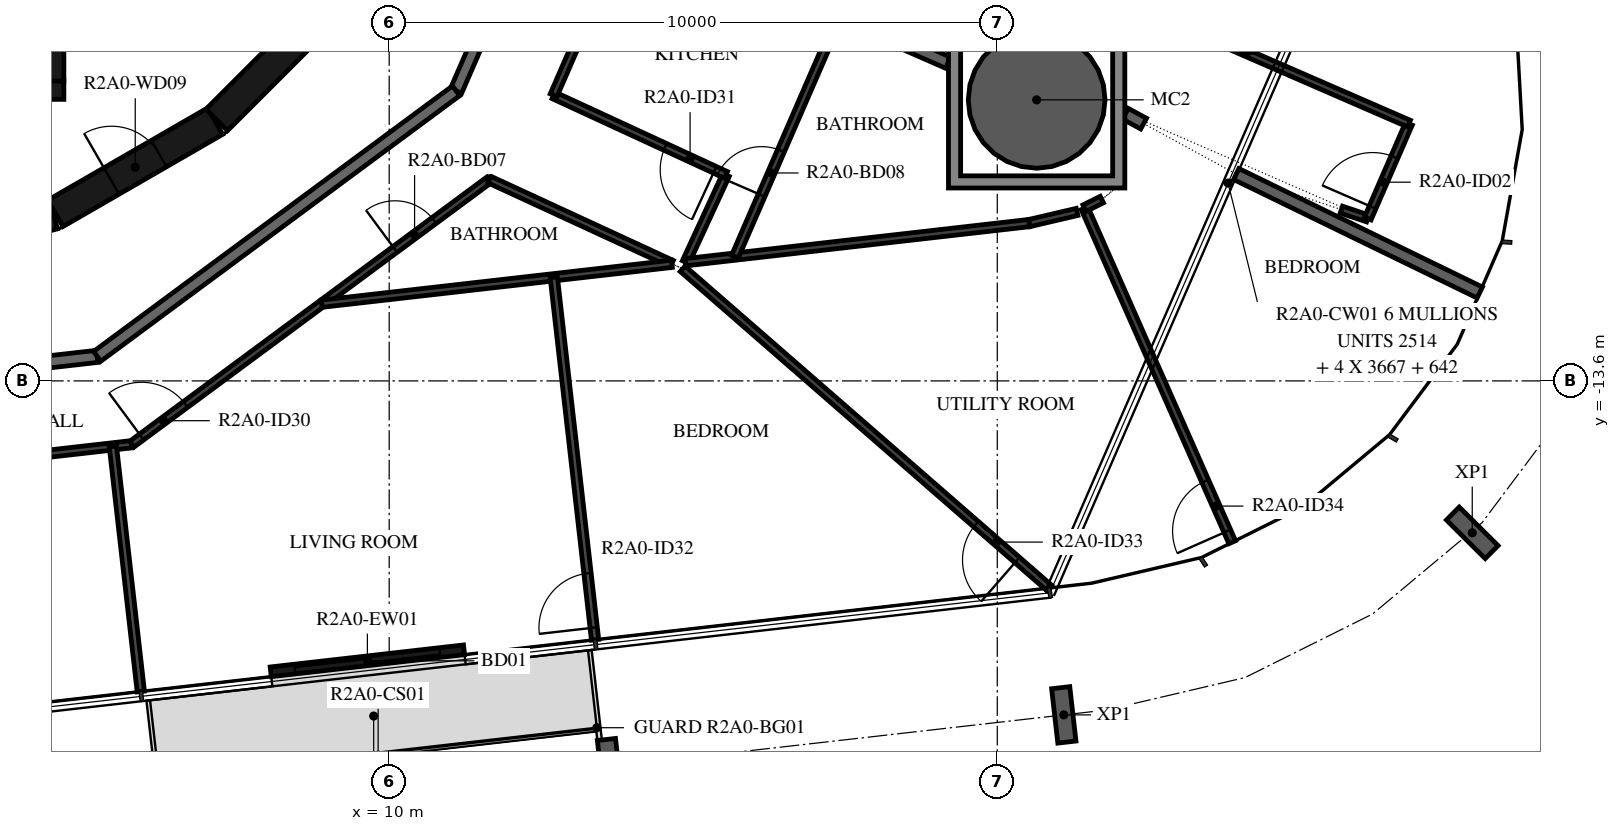
"""IFC4 building model, lengths in metres.
Left out: names, types, materials, properties, quantities, classifications, styles, units other than length and angle.
Written with IfcOpenShell. Run it as: python <this file> out.ifc"""

import sys

from ifc_helpers import new_model, si_unit, direction, frame, frame_2d, origin, origin_2d, place, context, subcontext, project, spatial, polyline, rectangle, hollow_circle, i_section, outline, extrude, element, fill, save


model = new_model("IFC4")
c1 = context("Model", 3, precision=1e-05, world=origin(), true_north=direction((0.0, 1.0)))
c2 = subcontext(c1, "Body", "Model", "MODEL_VIEW")
j1 = project(units=[si_unit("LENGTHUNIT", "METRE"), si_unit("PLANEANGLEUNIT", "RADIAN")], contexts=[c1])
p1 = place(None, origin())
s1 = spatial("IfcSite", under=j1, at=p1, CompositionType="ELEMENT")
p2 = place(p1, origin())
s2 = spatial("IfcBuilding", under=s1, at=p2, CompositionType="ELEMENT")
p3 = place(p2, frame((0.0, 0.0, 83.7)))
s3 = spatial("IfcBuildingStorey", under=s2, at=p3, CompositionType="ELEMENT", Elevation=83.7)
p4 = place(p3, frame((20.648, -8.978, -0.38), z_axis=(0.0, 0.0, 1.0), x_axis=(1.0, 0.0, 0.0)))
e1 = element("IfcColumn", 1, at=p4, inside=s3, PredefinedType="COLUMN", context=c2, shape_type="SweptSolid", body=[
    extrude(hollow_circle(Radius=1.125, WallThickness=0.055, at=origin_2d()), origin(), (0.0, 0.0, 1.0), 3.5),
])
for number, where, z_axis, x_axis in (
    (2, (13.624, -19.944, -0.38), (0.0, 0.0, 1.0), (-0.994, -0.113, 0.0)),
    (3, (21.094, -19.092, -0.38), (0.0, 0.0, 1.0), (-0.994, -0.113, 0.0)),
    (4, (27.811, -16.098, -0.38), (0.0, 0.0, 1.0), (-0.705, -0.709, 0.0)),
):
    element("IfcColumn", number, at=place(p3, frame(where, z_axis=z_axis, x_axis=x_axis)), inside=s3, PredefinedType="COLUMN", context=c2, shape_type="SweptSolid", body=[
        extrude(i_section(OverallWidth=0.3, OverallDepth=0.9, WebThickness=0.019, FlangeThickness=0.035, FilletRadius=0.03, at=origin_2d()), origin(), (0.0, 0.0, 1.0), 3.5),
    ])
p5 = place(p3, frame((8.052, -18.384, 0.0), z_axis=(0.0, 0.0, 1.0), x_axis=(0.993569997097, 0.113219525124, 0.0)))
e5 = element("IfcWall", 5, at=p5, inside=s3, PredefinedType="STANDARD", context=c2, shape_type="SweptSolid", body=[
    extrude(rectangle(XDim=3.2, YDim=0.16, at=frame_2d((1.6, 0.0))), origin(), (0.0, 0.0, 1.0), 3.12),
])
p6 = place(p5, frame((0.4, 0.0, 0.0)))
e6 = element("IfcOpeningElement", 6, at=p6, cuts=e5, PredefinedType="OPENING", context=c2, shape_type="SweptSolid", body=[
    extrude(rectangle(XDim=2.4, YDim=2.4, at=frame_2d((1.2, 1.2))), frame((0.0, 0.09, 0.0), z_axis=(0.0, -1.0, 0.0), x_axis=(1.0, 0.0, 0.0)), (0.0, 0.0, 1.0), 0.18),
])
p7 = place(p3, frame((1.55, -11.643, 0.0), z_axis=(0.0, 0.0, 1.0), x_axis=(0.965948410781, 0.258734743916, 0.0)))
e7 = element("IfcWall", 7, at=p7, inside=s3, PredefinedType="SHEAR", context=c2, shape_type="SweptSolid", body=[
    extrude(rectangle(XDim=3.033, YDim=0.5, at=frame_2d((1.516, 0.0))), origin(), (0.0, 0.0, 1.0), 3.12),
])
p8 = place(p3, frame((4.51, -10.845, 0.0), z_axis=(0.0, 0.0, 1.0), x_axis=(0.865975092491, 0.500087131594, 0.0)))
e8 = element("IfcWall", 8, at=p8, inside=s3, PredefinedType="SHEAR", context=c2, shape_type="SweptSolid", body=[
    extrude(rectangle(XDim=3.033, YDim=0.5, at=frame_2d((1.516, 0.0))), origin(), (0.0, 0.0, 1.0), 3.12),
])
p9 = place(p8, frame((1.066, 0.0, 0.0)))
e9 = element("IfcOpeningElement", 9, at=p9, cuts=e8, PredefinedType="OPENING", context=c2, shape_type="SweptSolid", body=[
    extrude(rectangle(XDim=0.9, YDim=2.1, at=frame_2d((0.45, 1.05))), frame((0.0, 0.26, 0.0), z_axis=(0.0, -1.0, 0.0), x_axis=(1.0, 0.0, 0.0)), (0.0, 0.0, 1.0), 0.52),
])
p10 = place(p3, frame((7.164, -9.308, 0.0), z_axis=(0.0, 0.0, 1.0), x_axis=(0.707106781187, 0.707106781187, 0.0)))
e10 = element("IfcWall", 10, at=p10, inside=s3, PredefinedType="SHEAR", context=c2, shape_type="SweptSolid", body=[
    extrude(rectangle(XDim=3.032, YDim=0.5, at=frame_2d((1.516, 0.0))), origin(), (0.0, 0.0, 1.0), 3.12),
])
p11 = place(p3, frame((4.5, -8.67, 0.0), z_axis=(0.0, 0.0, 1.0), x_axis=(0.0, 1.0, 0.0)))
e11 = element("IfcWall", 11, at=p11, inside=s3, PredefinedType="SHEAR", context=c2, shape_type="SweptSolid", body=[
    extrude(rectangle(XDim=3.32, YDim=0.3, at=frame_2d((1.66, 0.0))), origin(), (0.0, 0.0, 1.0), 3.12),
])
p12 = place(p3, frame((0.1, -8.82, 0.0), z_axis=(0.0, 0.0, 1.0), x_axis=(1.0, 0.0, 0.0)))
e12 = element("IfcWall", 12, at=p12, inside=s3, PredefinedType="SHEAR", context=c2, shape_type="SweptSolid", body=[
    extrude(rectangle(XDim=4.55, YDim=0.3, at=frame_2d((2.275, 0.0))), origin(), (0.0, 0.0, 1.0), 3.12),
])
p13 = place(p3, frame((11.1, -8.829, 0.0), z_axis=(0.0, 0.0, 1.0), x_axis=(0.398741918631, 0.917063183388, 0.0)))
e13 = element("IfcWall", 13, at=p13, inside=s3, PredefinedType="STANDARD", context=c2, shape_type="SweptSolid", body=[
    extrude(rectangle(XDim=7.342, YDim=0.2, at=frame_2d((3.671, 0.0))), origin(), (0.0, 0.0, 1.0), 3.12),
])
p14 = place(p3, frame((-2.096, -14.028, 0.0), z_axis=(0.0, 0.0, 1.0), x_axis=(0.993569170114, 0.113226782163, 0.0)))
e14 = element("IfcWall", 14, at=p14, inside=s3, PredefinedType="STANDARD", context=c2, shape_type="SweptSolid", body=[
    extrude(rectangle(XDim=7.342, YDim=0.2, at=frame_2d((3.671, 0.0))), origin(), (0.0, 0.0, 1.0), 3.12),
])
p15 = place(p14, frame((0.5, 0.0, 0.0)))
e15 = element("IfcOpeningElement", 15, at=p15, cuts=e14, PredefinedType="OPENING", context=c2, shape_type="SweptSolid", body=[
    extrude(rectangle(XDim=1.0, YDim=2.1, at=frame_2d((0.5, 1.05))), frame((0.0, 0.11, 0.0), z_axis=(0.0, -1.0, 0.0), x_axis=(1.0, 0.0, 0.0)), (0.0, 0.0, 1.0), 0.22),
])
p16 = place(p3, frame((5.198, -13.196, 0.0), z_axis=(0.0, 0.0, 1.0), x_axis=(0.803869883159, 0.594805187394, 0.0)))
e16 = element("IfcWall", 16, at=p16, inside=s3, PredefinedType="STANDARD", context=c2, shape_type="SweptSolid", body=[
    extrude(rectangle(XDim=7.342, YDim=0.2, at=frame_2d((3.671, 0.0))), origin(), (0.0, 0.0, 1.0), 3.12),
])
p17 = place(p3, frame((12.564, -5.463, 0.0), z_axis=(0.0, 0.0, 1.0), x_axis=(0.915914014963, -0.401374534812, 0.0)))
e17 = element("IfcWall", 17, at=p17, inside=s3, PredefinedType="STANDARD", context=c2, shape_type="SweptSolid", body=[
    extrude(rectangle(XDim=7.236, YDim=0.2, at=frame_2d((3.618, 0.0))), origin(), (0.0, 0.0, 1.0), 3.12),
])
p18 = place(p3, frame((22.108, -9.207, 0.0), z_axis=(0.0, 0.0, 1.0), x_axis=(0.878251516807, -0.478198989151, 0.0)))
e18 = element("IfcWall", 18, at=p18, inside=s3, PredefinedType="STANDARD", context=c2, shape_type="SweptSolid", body=[
    extrude(rectangle(XDim=0.341, YDim=0.2, at=frame_2d((0.17, 0.0))), origin(), (0.0, 0.0, 1.0), 3.12),
])
p19 = place(p3, frame((23.929, -10.198, 0.0), z_axis=(0.0, 0.0, 1.0), x_axis=(0.899252572086, -0.437429779046, 0.0)))
e19 = element("IfcWall", 19, at=p19, inside=s3, PredefinedType="STANDARD", context=c2, shape_type="SweptSolid", body=[
    extrude(rectangle(XDim=4.454, YDim=0.2, at=frame_2d((2.227, 0.0))), origin(), (0.0, 0.0, 1.0), 3.12),
])
p20 = place(p3, frame((25.659, -10.783, 0.0), z_axis=(0.0, 0.0, 1.0), x_axis=(0.948362418423, -0.317188781837, 0.0)))
e20 = element("IfcWall", 20, at=p20, inside=s3, PredefinedType="PARTITIONING", context=c2, shape_type="SweptSolid", body=[
    extrude(rectangle(XDim=0.457, YDim=0.12, at=frame_2d((0.229, 0.0))), origin(), (0.0, 0.0, 1.0), 3.12),
])
p21 = place(p3, frame((26.092, -10.928, 0.0), z_axis=(0.0, 0.0, 1.0), x_axis=(0.398783871208, 0.917044941137, 0.0)))
e21 = element("IfcWall", 21, at=p21, inside=s3, PredefinedType="PARTITIONING", context=c2, shape_type="SweptSolid", body=[
    extrude(rectangle(XDim=1.7, YDim=0.12, at=frame_2d((0.85, 0.0))), origin(), (0.0, 0.0, 1.0), 3.12),
])
p22 = place(p21, frame((0.2, 0.0, 0.0)))
e22 = element("IfcOpeningElement", 22, at=p22, cuts=e21, PredefinedType="OPENING", context=c2, shape_type="SweptSolid", body=[
    extrude(rectangle(XDim=0.9, YDim=2.1, at=frame_2d((0.45, 1.05))), frame((0.0, 0.07, 0.0), z_axis=(0.0, -1.0, 0.0), x_axis=(1.0, 0.0, 0.0)), (0.0, 0.0, 1.0), 0.14),
])
p23 = place(p3, frame((26.77, -9.369, 0.0), z_axis=(0.0, 0.0, 1.0), x_axis=(-0.917058488031, 0.39875271727, 0.0)))
e23 = element("IfcWall", 23, at=p23, inside=s3, PredefinedType="PARTITIONING", context=c2, shape_type="SweptSolid", body=[
    extrude(rectangle(XDim=13.086, YDim=0.12, at=frame_2d((6.543, 0.0))), origin(), (0.0, 0.0, 1.0), 3.12),
])
p24 = place(p23, frame((6.889, 0.0, 0.0)))
e24 = element("IfcOpeningElement", 24, at=p24, cuts=e23, PredefinedType="OPENING", context=c2, shape_type="SweptSolid", body=[
    extrude(rectangle(XDim=0.8, YDim=2.1, at=frame_2d((0.4, 1.05))), frame((0.0, 0.07, 0.0), z_axis=(0.0, -1.0, 0.0), x_axis=(1.0, 0.0, 0.0)), (0.0, 0.0, 1.0), 0.14),
])
p25 = place(p23, frame((9.358, 0.0, 0.0)))
e25 = element("IfcOpeningElement", 25, at=p25, cuts=e23, PredefinedType="OPENING", context=c2, shape_type="SweptSolid", body=[
    extrude(rectangle(XDim=0.9, YDim=2.1, at=frame_2d((0.45, 1.05))), frame((0.0, 0.07, 0.0), z_axis=(0.0, -1.0, 0.0), x_axis=(1.0, 0.0, 0.0)), (0.0, 0.0, 1.0), 0.14),
])
p26 = place(p3, frame((23.93, -7.573, 0.0), z_axis=(0.0, 0.0, 1.0), x_axis=(0.28441027407, -0.958702662979, 0.0)))
e26 = element("IfcWall", 26, at=p26, inside=s3, PredefinedType="PARTITIONING", context=c2, shape_type="SweptSolid", body=[
    extrude(rectangle(XDim=0.671, YDim=0.12, at=frame_2d((0.336, 0.0))), origin(), (0.0, 0.0, 1.0), 3.12),
])
p27 = place(p3, frame((3.138, -14.941, 0.0), z_axis=(0.0, 0.0, 1.0), x_axis=(0.99356355736, 0.113276023437, 0.0)))
e27 = element("IfcWall", 27, at=p27, inside=s3, PredefinedType="PARTITIONING", context=c2, shape_type="SweptSolid", body=[
    extrude(rectangle(XDim=2.647, YDim=0.12, at=frame_2d((1.323, 0.0))), origin(), (0.0, 0.0, 1.0), 3.12),
])
p28 = place(p3, frame((5.767, -14.641, 0.0), z_axis=(0.0, 0.0, 1.0), x_axis=(0.803867427863, 0.594808505673, 0.0)))
e28 = element("IfcWall", 28, at=p28, inside=s3, PredefinedType="PARTITIONING", context=c2, shape_type="SweptSolid", body=[
    extrude(rectangle(XDim=7.316, YDim=0.12, at=frame_2d((3.658, 0.0))), origin(), (0.0, 0.0, 1.0), 3.12),
])
p29 = place(p28, frame((0.2, 0.0, 0.0)))
e29 = element("IfcOpeningElement", 29, at=p29, cuts=e28, PredefinedType="OPENING", context=c2, shape_type="SweptSolid", body=[
    extrude(rectangle(XDim=0.9, YDim=2.1, at=frame_2d((0.45, 1.05))), frame((0.0, 0.07, 0.0), z_axis=(0.0, -1.0, 0.0), x_axis=(1.0, 0.0, 0.0)), (0.0, 0.0, 1.0), 0.14),
])
p30 = place(p28, frame((5.385, 0.0, 0.0)))
e30 = element("IfcOpeningElement", 30, at=p30, cuts=e28, PredefinedType="OPENING", context=c2, shape_type="SweptSolid", body=[
    extrude(rectangle(XDim=0.8, YDim=2.1, at=frame_2d((0.4, 1.05))), frame((0.0, 0.07, 0.0), z_axis=(0.0, -1.0, 0.0), x_axis=(1.0, 0.0, 0.0)), (0.0, 0.0, 1.0), 0.14),
])
p31 = place(p3, frame((11.649, -10.289, 0.0), z_axis=(0.0, 0.0, 1.0), x_axis=(0.9079269461, -0.419128453514, 0.0)))
e31 = element("IfcWall", 31, at=p31, inside=s3, PredefinedType="PARTITIONING", context=c2, shape_type="SweptSolid", body=[
    extrude(rectangle(XDim=3.304, YDim=0.12, at=frame_2d((1.652, 0.0))), origin(), (0.0, 0.0, 1.0), 3.12),
])
p32 = place(p3, frame((14.875, -11.648, 0.0), z_axis=(0.0, 0.0, 1.0), x_axis=(0.419087543301, 0.90794583046, 0.0)))
e32 = element("IfcWall", 32, at=p32, inside=s3, PredefinedType="PARTITIONING", context=c2, shape_type="SweptSolid", body=[
    extrude(rectangle(XDim=1.582, YDim=0.12, at=frame_2d((0.791, 0.0))), origin(), (0.0, 0.0, 1.0), 3.12),
])
p33 = place(p3, frame((15.538, -10.212, 0.0), z_axis=(0.0, 0.0, 1.0), x_axis=(-0.907941075756, 0.419097844131, 0.0)))
e33 = element("IfcWall", 33, at=p33, inside=s3, PredefinedType="PARTITIONING", context=c2, shape_type="SweptSolid", body=[
    extrude(rectangle(XDim=3.122, YDim=0.12, at=frame_2d((1.561, 0.0))), origin(), (0.0, 0.0, 1.0), 3.12),
])
p34 = place(p33, frame((0.2, 0.0, 0.0)))
e34 = element("IfcOpeningElement", 34, at=p34, cuts=e33, PredefinedType="OPENING", context=c2, shape_type="SweptSolid", body=[
    extrude(rectangle(XDim=0.9, YDim=2.1, at=frame_2d((0.45, 1.05))), frame((0.0, 0.07, 0.0), z_axis=(0.0, -1.0, 0.0), x_axis=(1.0, 0.0, 0.0)), (0.0, 0.0, 1.0), 0.14),
])
p35 = place(p3, frame((12.703, -8.904, 0.0), z_axis=(0.0, 0.0, 1.0), x_axis=(0.398679720725, 0.917090224723, 0.0)))
e35 = element("IfcWall", 35, at=p35, inside=s3, PredefinedType="PARTITIONING", context=c2, shape_type="SweptSolid", body=[
    extrude(rectangle(XDim=3.079, YDim=0.12, at=frame_2d((1.54, 0.0))), origin(), (0.0, 0.0, 1.0), 3.12),
])
p36 = place(p3, frame((5.915, -18.708, 0.0), z_axis=(0.0, 0.0, 1.0), x_axis=(-0.113244511591, 0.993567149515, 0.0)))
e36 = element("IfcWall", 36, at=p36, inside=s3, PredefinedType="PARTITIONING", context=c2, shape_type="SweptSolid", body=[
    extrude(rectangle(XDim=4.057, YDim=0.12, at=frame_2d((2.029, 0.0))), origin(), (0.0, 0.0, 1.0), 2.73),
])
p37 = place(p3, frame((14.649, -11.674, 0.0), z_axis=(0.0, 0.0, 1.0), x_axis=(-0.993573746873, -0.113186613721, 0.0)))
e37 = element("IfcWall", 37, at=p37, inside=s3, PredefinedType="PARTITIONING", context=c2, shape_type="SweptSolid", body=[
    extrude(rectangle(XDim=5.796, YDim=0.12, at=frame_2d((2.898, 0.0))), origin(), (0.0, 0.0, 1.0), 3.12),
])
p38 = place(p3, frame((13.386, -17.857, 0.0), z_axis=(0.0, 0.0, 1.0), x_axis=(-0.113200012983, 0.993572220355, 0.0)))
e38 = element("IfcWall", 38, at=p38, inside=s3, PredefinedType="PARTITIONING", context=c2, shape_type="SweptSolid", body=[
    extrude(rectangle(XDim=6.0, YDim=0.12, at=frame_2d((3.0, 0.0))), origin(), (0.0, 0.0, 1.0), 2.73),
])
p39 = place(p38, frame((0.2, 0.0, 0.0)))
e39 = element("IfcOpeningElement", 39, at=p39, cuts=e38, PredefinedType="OPENING", context=c2, shape_type="SweptSolid", body=[
    extrude(rectangle(XDim=0.9, YDim=2.1, at=frame_2d((0.45, 1.05))), frame((0.0, 0.07, 0.0), z_axis=(0.0, -1.0, 0.0), x_axis=(1.0, 0.0, 0.0)), (0.0, 0.0, 1.0), 0.14),
])
p40 = place(p3, frame((20.856, -17.006, 0.0), z_axis=(0.0, 0.0, 1.0), x_axis=(-0.75423134567, 0.656608770281, 0.0)))
e40 = element("IfcWall", 40, at=p40, inside=s3, PredefinedType="PARTITIONING", context=c2, shape_type="SweptSolid", body=[
    extrude(rectangle(XDim=7.995, YDim=0.12, at=frame_2d((3.998, 0.0))), origin(), (0.0, 0.0, 1.0), 3.12),
])
p41 = place(p40, frame((0.7, 0.0, 0.0)))
e41 = element("IfcOpeningElement", 41, at=p41, cuts=e40, PredefinedType="OPENING", context=c2, shape_type="SweptSolid", body=[
    extrude(rectangle(XDim=0.9, YDim=2.1, at=frame_2d((0.45, 1.05))), frame((0.0, 0.07, 0.0), z_axis=(0.0, -1.0, 0.0), x_axis=(1.0, 0.0, 0.0)), (0.0, 0.0, 1.0), 0.14),
])
p42 = place(p3, frame((20.527, -11.004, 0.0), z_axis=(0.0, 0.0, 1.0), x_axis=(-0.993568869194, -0.113229422712, 0.0)))
e42 = element("IfcWall", 42, at=p42, inside=s3, PredefinedType="PARTITIONING", context=c2, shape_type="SweptSolid", body=[
    extrude(rectangle(XDim=5.688, YDim=0.12, at=frame_2d((2.844, 0.0))), origin(), (0.0, 0.0, 1.0), 3.12),
])
p43 = place(p3, frame((21.312, -10.821, 0.0), z_axis=(0.0, 0.0, 1.0), x_axis=(-0.973765266404, -0.227554841621, 0.0)))
e43 = element("IfcWall", 43, at=p43, inside=s3, PredefinedType="PARTITIONING", context=c2, shape_type="SweptSolid", body=[
    extrude(rectangle(XDim=0.807, YDim=0.12, at=frame_2d((0.403, 0.0))), origin(), (0.0, 0.0, 1.0), 3.12),
])
p44 = place(p3, frame((23.864, -16.253, 0.0), z_axis=(0.0, 0.0, 1.0), x_axis=(-0.404274566917, 0.914637673915, 0.0)))
e44 = element("IfcWall", 44, at=p44, inside=s3, PredefinedType="PARTITIONING", context=c2, shape_type="SweptSolid", body=[
    extrude(rectangle(XDim=6.006, YDim=0.12, at=frame_2d((3.003, 0.0))), origin(), (0.0, 0.0, 1.0), 3.12),
])
p45 = place(p44, frame((0.2, 0.0, 0.0)))
e45 = element("IfcOpeningElement", 45, at=p45, cuts=e44, PredefinedType="OPENING", context=c2, shape_type="SweptSolid", body=[
    extrude(rectangle(XDim=0.9, YDim=2.1, at=frame_2d((0.45, 1.05))), frame((0.0, 0.07, 0.0), z_axis=(0.0, -1.0, 0.0), x_axis=(1.0, 0.0, 0.0)), (0.0, 0.0, 1.0), 0.14),
])
p46 = place(p3, frame((15.686, -11.556, 0.0), z_axis=(0.0, 0.0, 1.0), x_axis=(0.398740569839, 0.917063769846, 0.0)))
e46 = element("IfcWall", 46, at=p46, inside=s3, PredefinedType="PARTITIONING", context=c2, shape_type="SweptSolid", body=[
    extrude(rectangle(XDim=4.322, YDim=0.12, at=frame_2d((2.161, 0.0))), origin(), (0.0, 0.0, 1.0), 3.12),
])
p47 = place(p46, frame((1.1, 0.0, 0.0)))
e47 = element("IfcOpeningElement", 47, at=p47, cuts=e46, PredefinedType="OPENING", context=c2, shape_type="SweptSolid", body=[
    extrude(rectangle(XDim=0.8, YDim=2.1, at=frame_2d((0.4, 1.05))), frame((0.0, 0.07, 0.0), z_axis=(0.0, -1.0, 0.0), x_axis=(1.0, 0.0, 0.0)), (0.0, 0.0, 1.0), 0.14),
])
p48 = place(p3, frame((21.435, -10.76, 0.0), z_axis=(0.0, 0.0, 1.0), x_axis=(0.895041493646, 0.445982874841, 0.0)))
e48 = element("IfcWall", 48, at=p48, inside=s3, PredefinedType="PARTITIONING", context=c2, shape_type="SweptSolid", body=[
    extrude(rectangle(XDim=0.317, YDim=0.12, at=frame_2d((0.159, 0.0))), origin(), (0.0, 0.0, 1.0), 3.12),
])
p49 = place(p3, origin())
e49 = element("IfcWall", 49, at=p49, inside=s3, PredefinedType="STANDARD", context=c2, shape_type="SweptSolid", body=[
    extrude(outline(polyline([(22.098, -7.528), (22.098, -10.428), (19.198, -10.428), (19.198, -7.528), (22.098, -7.528)]), holes=[polyline([(19.398, -10.228), (21.898, -10.228), (21.898, -7.728), (19.398, -7.728), (19.398, -10.228)])]), origin(), (0.0, 0.0, 1.0), 3.12),
])
p50 = place(p6, origin())
e50 = element("IfcDoor", 50, at=p50, inside=s3, OperationType="DOUBLE_DOOR_SLIDING", PredefinedType="DOOR", context=c2, shape_type="SweptSolid", body=[
    extrude(rectangle(XDim=2.4, YDim=2.4, at=frame_2d((1.2, 1.2))), frame((0.0, 0.025, 0.0), z_axis=(0.0, -1.0, 0.0), x_axis=(1.0, 0.0, 0.0)), (0.0, 0.0, 1.0), 0.05),
])
fill(e6, e50)
p51 = place(p9, origin())
e51 = element("IfcDoor", 51, at=p51, inside=s3, OperationType="SINGLE_SWING_RIGHT", PredefinedType="DOOR", context=c2, shape_type="SweptSolid", body=[
    extrude(rectangle(XDim=0.9, YDim=2.1, at=frame_2d((0.45, 1.05))), frame((0.0, 0.025, 0.0), z_axis=(0.0, -1.0, 0.0), x_axis=(1.0, 0.0, 0.0)), (0.0, 0.0, 1.0), 0.05),
])
fill(e9, e51)
p52 = place(p22, origin())
e52 = element("IfcDoor", 52, at=p52, inside=s3, OperationType="SINGLE_SWING_LEFT", PredefinedType="DOOR", context=c2, shape_type="SweptSolid", body=[
    extrude(rectangle(XDim=0.9, YDim=2.1, at=frame_2d((0.45, 1.05))), frame((0.0, 0.025, 0.0), z_axis=(0.0, -1.0, 0.0), x_axis=(1.0, 0.0, 0.0)), (0.0, 0.0, 1.0), 0.05),
])
fill(e22, e52)
p53 = place(p29, origin())
e53 = element("IfcDoor", 53, at=p53, inside=s3, OperationType="SINGLE_SWING_RIGHT", PredefinedType="DOOR", context=c2, shape_type="SweptSolid", body=[
    extrude(rectangle(XDim=0.9, YDim=2.1, at=frame_2d((0.45, 1.05))), frame((0.0, 0.025, 0.0), z_axis=(0.0, -1.0, 0.0), x_axis=(1.0, 0.0, 0.0)), (0.0, 0.0, 1.0), 0.05),
])
fill(e29, e53)
p54 = place(p30, origin())
e54 = element("IfcDoor", 54, at=p54, inside=s3, OperationType="SINGLE_SWING_RIGHT", PredefinedType="DOOR", context=c2, shape_type="SweptSolid", body=[
    extrude(rectangle(XDim=0.8, YDim=2.1, at=frame_2d((0.4, 1.05))), frame((0.0, 0.025, 0.0), z_axis=(0.0, -1.0, 0.0), x_axis=(1.0, 0.0, 0.0)), (0.0, 0.0, 1.0), 0.05),
])
fill(e30, e54)
p55 = place(p34, origin())
e55 = element("IfcDoor", 55, at=p55, inside=s3, OperationType="SINGLE_SWING_LEFT", PredefinedType="DOOR", context=c2, shape_type="SweptSolid", body=[
    extrude(rectangle(XDim=0.9, YDim=2.1, at=frame_2d((0.45, 1.05))), frame((0.0, 0.025, 0.0), z_axis=(0.0, -1.0, 0.0), x_axis=(1.0, 0.0, 0.0)), (0.0, 0.0, 1.0), 0.05),
])
fill(e34, e55)
p56 = place(p39, origin())
e56 = element("IfcDoor", 56, at=p56, inside=s3, OperationType="SINGLE_SWING_RIGHT", PredefinedType="DOOR", context=c2, shape_type="SweptSolid", body=[
    extrude(rectangle(XDim=0.9, YDim=2.1, at=frame_2d((0.45, 1.05))), frame((0.0, 0.025, 0.0), z_axis=(0.0, -1.0, 0.0), x_axis=(1.0, 0.0, 0.0)), (0.0, 0.0, 1.0), 0.05),
])
fill(e39, e56)
p57 = place(p47, origin())
e57 = element("IfcDoor", 57, at=p57, inside=s3, OperationType="SINGLE_SWING_RIGHT", PredefinedType="DOOR", context=c2, shape_type="SweptSolid", body=[
    extrude(rectangle(XDim=0.8, YDim=2.1, at=frame_2d((0.4, 1.05))), frame((0.0, 0.025, 0.0), z_axis=(0.0, -1.0, 0.0), x_axis=(1.0, 0.0, 0.0)), (0.0, 0.0, 1.0), 0.05),
])
fill(e47, e57)
p58 = place(p41, origin())
e58 = element("IfcDoor", 58, at=p58, inside=s3, OperationType="SINGLE_SWING_RIGHT", PredefinedType="DOOR", context=c2, shape_type="SweptSolid", body=[
    extrude(rectangle(XDim=0.9, YDim=2.1, at=frame_2d((0.45, 1.05))), frame((0.0, 0.025, 0.0), z_axis=(0.0, -1.0, 0.0), x_axis=(1.0, 0.0, 0.0)), (0.0, 0.0, 1.0), 0.05),
])
fill(e41, e58)
p59 = place(p45, origin())
e59 = element("IfcDoor", 59, at=p59, inside=s3, OperationType="SINGLE_SWING_RIGHT", PredefinedType="DOOR", context=c2, shape_type="SweptSolid", body=[
    extrude(rectangle(XDim=0.9, YDim=2.1, at=frame_2d((0.45, 1.05))), frame((0.0, 0.025, 0.0), z_axis=(0.0, -1.0, 0.0), x_axis=(1.0, 0.0, 0.0)), (0.0, 0.0, 1.0), 0.05),
])
fill(e45, e59)
save(model, sys.argv[1])
